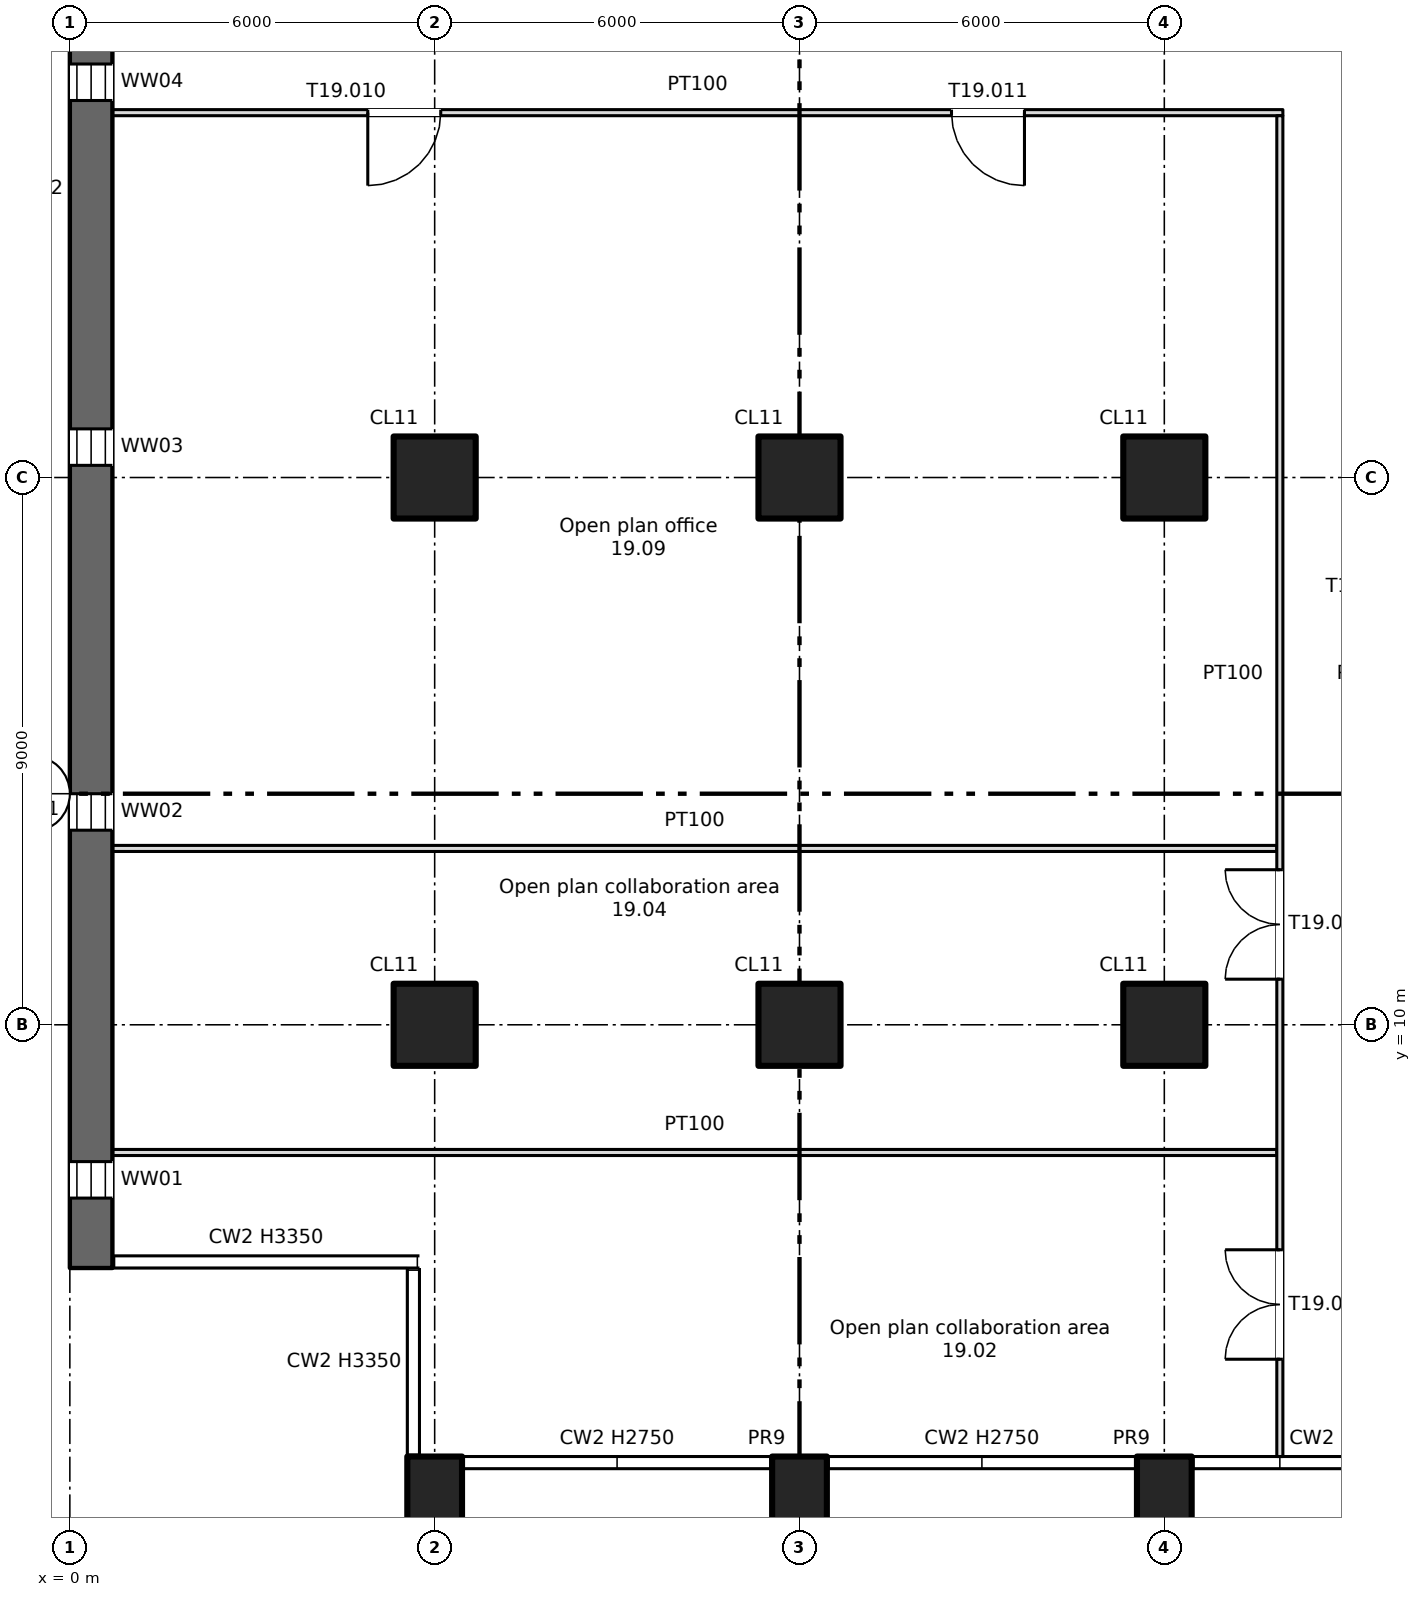
"""IFC4 building model, lengths in metres.
Left out: names, types, materials, properties, quantities, classifications, styles, units other than length and angle.
Written with IfcOpenShell. Run it as: python <this file> out.ifc"""

import sys

from ifc_helpers import new_model, si_unit, direction, frame, frame_2d, origin, origin_2d, place, context, subcontext, project, spatial, rectangle, extrude, element, fill, save


model = new_model("IFC4")
c1 = context("Model", 3, precision=1e-05, world=origin(), true_north=direction((0.0, 1.0)))
c2 = subcontext(c1, "Body", "Model", "MODEL_VIEW")
j1 = project(units=[si_unit("LENGTHUNIT", "METRE"), si_unit("PLANEANGLEUNIT", "RADIAN")], contexts=[c1])
p1 = place(None, origin())
s1 = spatial("IfcSite", under=j1, at=p1, CompositionType="ELEMENT")
p2 = place(p1, origin())
s2 = spatial("IfcBuilding", under=s1, at=p2, CompositionType="ELEMENT")
p3 = place(p2, frame((0.0, 0.0, 121.25)))
s3 = spatial("IfcBuildingStorey", under=s2, at=p3, CompositionType="ELEMENT", Elevation=121.25)
for number, where, z_axis, x_axis in (
    (1, (6.0, 2.2, -0.4), (0.0, 0.0, 1.0), (1.0, 0.0, 0.0)),
    (2, (12.0, 2.2, -0.4), (0.0, 0.0, 1.0), (1.0, 0.0, 0.0)),
    (3, (18.0, 2.2, -0.4), (0.0, 0.0, 1.0), (1.0, 0.0, 0.0)),
):
    element("IfcColumn", number, at=place(p3, frame(where, z_axis=z_axis, x_axis=x_axis)), inside=s3, PredefinedType="COLUMN", context=c2, shape_type="SweptSolid", body=[
        extrude(rectangle(XDim=0.9, YDim=1.4, at=origin_2d()), origin(), (0.0, 0.0, 1.0), 3.75),
    ])
for number, where, z_axis, x_axis in (
    (4, (6.0, 10.0, 0.0), (0.0, 0.0, 1.0), (1.0, 0.0, 0.0)),
    (5, (6.0, 19.0, 0.0), (0.0, 0.0, 1.0), (1.0, 0.0, 0.0)),
    (6, (12.0, 10.0, 0.0), (0.0, 0.0, 1.0), (1.0, 0.0, 0.0)),
    (7, (12.0, 19.0, 0.0), (0.0, 0.0, 1.0), (1.0, 0.0, 0.0)),
    (8, (18.0, 10.0, 0.0), (0.0, 0.0, 1.0), (1.0, 0.0, 0.0)),
    (9, (18.0, 19.0, 0.0), (0.0, 0.0, 1.0), (1.0, 0.0, 0.0)),
):
    element("IfcColumn", number, at=place(p3, frame(where, z_axis=z_axis, x_axis=x_axis)), inside=s3, PredefinedType="COLUMN", context=c2, shape_type="SweptSolid", body=[
        extrude(rectangle(XDim=1.35, YDim=1.35, at=origin_2d()), origin(), (0.0, 0.0, 1.0), 3.35),
    ])
p4 = place(p3, frame((0.35, 6.0, 0.0), z_axis=(0.0, 0.0, 1.0), x_axis=(0.0, 1.0, 0.0)))
e10 = element("IfcWall", 10, at=p4, inside=s3, PredefinedType="SHEAR", context=c2, shape_type="SweptSolid", body=[
    extrude(rectangle(XDim=35.5, YDim=0.7, at=frame_2d((17.75, 0.0))), origin(), (0.0, 0.0, 1.0), 3.35),
])
p5 = place(p4, frame((1.15, 0.0, 0.6)))
e11 = element("IfcOpeningElement", 11, at=p5, cuts=e10, PredefinedType="OPENING", context=c2, shape_type="SweptSolid", body=[
    extrude(rectangle(XDim=0.6, YDim=2.4, at=frame_2d((0.3, 1.2))), frame((0.0, 0.36, 0.0), z_axis=(0.0, -1.0, 0.0), x_axis=(1.0, 0.0, 0.0)), (0.0, 0.0, 1.0), 0.72),
])
p6 = place(p4, frame((7.2, 0.0, 0.6)))
e12 = element("IfcOpeningElement", 12, at=p6, cuts=e10, PredefinedType="OPENING", context=c2, shape_type="SweptSolid", body=[
    extrude(rectangle(XDim=0.6, YDim=2.4, at=frame_2d((0.3, 1.2))), frame((0.0, 0.36, 0.0), z_axis=(0.0, -1.0, 0.0), x_axis=(1.0, 0.0, 0.0)), (0.0, 0.0, 1.0), 0.72),
])
p7 = place(p4, frame((13.2, 0.0, 0.6)))
e13 = element("IfcOpeningElement", 13, at=p7, cuts=e10, PredefinedType="OPENING", context=c2, shape_type="SweptSolid", body=[
    extrude(rectangle(XDim=0.6, YDim=2.4, at=frame_2d((0.3, 1.2))), frame((0.0, 0.36, 0.0), z_axis=(0.0, -1.0, 0.0), x_axis=(1.0, 0.0, 0.0)), (0.0, 0.0, 1.0), 0.72),
])
p8 = place(p4, frame((19.2, 0.0, 0.6)))
e14 = element("IfcOpeningElement", 14, at=p8, cuts=e10, PredefinedType="OPENING", context=c2, shape_type="SweptSolid", body=[
    extrude(rectangle(XDim=0.6, YDim=2.4, at=frame_2d((0.3, 1.2))), frame((0.0, 0.36, 0.0), z_axis=(0.0, -1.0, 0.0), x_axis=(1.0, 0.0, 0.0)), (0.0, 0.0, 1.0), 0.72),
])
p9 = place(p4, frame((25.2, 0.0, 0.6)))
e15 = element("IfcOpeningElement", 15, at=p9, cuts=e10, PredefinedType="OPENING", context=c2, shape_type="SweptSolid", body=[
    extrude(rectangle(XDim=0.6, YDim=2.4, at=frame_2d((0.3, 1.2))), frame((0.0, 0.36, 0.0), z_axis=(0.0, -1.0, 0.0), x_axis=(1.0, 0.0, 0.0)), (0.0, 0.0, 1.0), 0.72),
])
p10 = place(p4, frame((31.2, 0.0, 0.6)))
e16 = element("IfcOpeningElement", 16, at=p10, cuts=e10, PredefinedType="OPENING", context=c2, shape_type="SweptSolid", body=[
    extrude(rectangle(XDim=0.6, YDim=2.4, at=frame_2d((0.3, 1.2))), frame((0.0, 0.36, 0.0), z_axis=(0.0, -1.0, 0.0), x_axis=(1.0, 0.0, 0.0)), (0.0, 0.0, 1.0), 0.72),
])
for number, where, z_axis, x_axis in (
    (17, (0.7, 7.9, 0.0), (0.0, 0.0, 1.0), (1.0, 0.0, 0.0)),
    (18, (0.7, 12.9, 0.0), (0.0, 0.0, 1.0), (1.0, 0.0, 0.0)),
):
    element("IfcWall", number, at=place(p3, frame(where, z_axis=z_axis, x_axis=x_axis)), inside=s3, PredefinedType="PARTITIONING", context=c2, shape_type="SweptSolid", body=[
        extrude(rectangle(XDim=19.15, YDim=0.1, at=frame_2d((9.575, 0.0))), origin(), (0.0, 0.0, 1.0), 3.35),
    ])
p11 = place(p3, frame((0.7, 25.0, 0.0), z_axis=(0.0, 0.0, 1.0), x_axis=(1.0, 0.0, 0.0)))
e19 = element("IfcWall", 19, at=p11, inside=s3, PredefinedType="PARTITIONING", context=c2, shape_type="SweptSolid", body=[
    extrude(rectangle(XDim=19.25, YDim=0.1, at=frame_2d((9.625, 0.0))), origin(), (0.0, 0.0, 1.0), 3.35),
])
p12 = place(p11, frame((4.2, 0.0, 0.0)))
e20 = element("IfcOpeningElement", 20, at=p12, cuts=e19, PredefinedType="OPENING", context=c2, shape_type="SweptSolid", body=[
    extrude(rectangle(XDim=1.2, YDim=2.1, at=frame_2d((0.6, 1.05))), frame((0.0, 0.06, 0.0), z_axis=(0.0, -1.0, 0.0), x_axis=(1.0, 0.0, 0.0)), (0.0, 0.0, 1.0), 0.12),
])
p13 = place(p11, frame((13.8, 0.0, 0.0)))
e21 = element("IfcOpeningElement", 21, at=p13, cuts=e19, PredefinedType="OPENING", context=c2, shape_type="SweptSolid", body=[
    extrude(rectangle(XDim=1.2, YDim=2.1, at=frame_2d((0.6, 1.05))), frame((0.0, 0.06, 0.0), z_axis=(0.0, -1.0, 0.0), x_axis=(1.0, 0.0, 0.0)), (0.0, 0.0, 1.0), 0.12),
])
p14 = place(p3, frame((19.9, 2.9, 0.0), z_axis=(0.0, 0.0, 1.0), x_axis=(0.0, 1.0, 0.0)))
e22 = element("IfcWall", 22, at=p14, inside=s3, PredefinedType="PARTITIONING", context=c2, shape_type="SweptSolid", body=[
    extrude(rectangle(XDim=22.05, YDim=0.1, at=frame_2d((11.025, 0.0))), origin(), (0.0, 0.0, 1.0), 3.35),
])
p15 = place(p14, frame((1.6, 0.0, 0.0)))
e23 = element("IfcOpeningElement", 23, at=p15, cuts=e22, PredefinedType="OPENING", context=c2, shape_type="SweptSolid", body=[
    extrude(rectangle(XDim=1.8, YDim=2.1, at=frame_2d((0.9, 1.05))), frame((0.0, 0.06, 0.0), z_axis=(0.0, -1.0, 0.0), x_axis=(1.0, 0.0, 0.0)), (0.0, 0.0, 1.0), 0.12),
])
p16 = place(p14, frame((7.85, 0.0, 0.0)))
e24 = element("IfcOpeningElement", 24, at=p16, cuts=e22, PredefinedType="OPENING", context=c2, shape_type="SweptSolid", body=[
    extrude(rectangle(XDim=1.8, YDim=2.1, at=frame_2d((0.9, 1.05))), frame((0.0, 0.06, 0.0), z_axis=(0.0, -1.0, 0.0), x_axis=(1.0, 0.0, 0.0)), (0.0, 0.0, 1.0), 0.12),
])
p17 = place(p5, origin())
e25 = element("IfcWindow", 25, at=p17, inside=s3, PartitioningType="SINGLE_PANEL", PredefinedType="WINDOW", context=c2, shape_type="SweptSolid", body=[
    extrude(rectangle(XDim=0.6, YDim=2.4, at=frame_2d((0.3, 1.2))), frame((0.0, 0.03, 0.0), z_axis=(0.0, -1.0, 0.0), x_axis=(1.0, 0.0, 0.0)), (0.0, 0.0, 1.0), 0.06),
])
fill(e11, e25)
p18 = place(p6, origin())
e26 = element("IfcWindow", 26, at=p18, inside=s3, PartitioningType="SINGLE_PANEL", PredefinedType="WINDOW", context=c2, shape_type="SweptSolid", body=[
    extrude(rectangle(XDim=0.6, YDim=2.4, at=frame_2d((0.3, 1.2))), frame((0.0, 0.03, 0.0), z_axis=(0.0, -1.0, 0.0), x_axis=(1.0, 0.0, 0.0)), (0.0, 0.0, 1.0), 0.06),
])
fill(e12, e26)
p19 = place(p7, origin())
e27 = element("IfcWindow", 27, at=p19, inside=s3, PartitioningType="SINGLE_PANEL", PredefinedType="WINDOW", context=c2, shape_type="SweptSolid", body=[
    extrude(rectangle(XDim=0.6, YDim=2.4, at=frame_2d((0.3, 1.2))), frame((0.0, 0.03, 0.0), z_axis=(0.0, -1.0, 0.0), x_axis=(1.0, 0.0, 0.0)), (0.0, 0.0, 1.0), 0.06),
])
fill(e13, e27)
p20 = place(p8, origin())
e28 = element("IfcWindow", 28, at=p20, inside=s3, PartitioningType="SINGLE_PANEL", PredefinedType="WINDOW", context=c2, shape_type="SweptSolid", body=[
    extrude(rectangle(XDim=0.6, YDim=2.4, at=frame_2d((0.3, 1.2))), frame((0.0, 0.03, 0.0), z_axis=(0.0, -1.0, 0.0), x_axis=(1.0, 0.0, 0.0)), (0.0, 0.0, 1.0), 0.06),
])
fill(e14, e28)
p21 = place(p15, origin())
e29 = element("IfcDoor", 29, at=p21, inside=s3, OperationType="DOUBLE_DOOR_SINGLE_SWING", PredefinedType="DOOR", context=c2, shape_type="SweptSolid", body=[
    extrude(rectangle(XDim=1.8, YDim=2.1, at=frame_2d((0.9, 1.05))), frame((0.0, 0.025, 0.0), z_axis=(0.0, -1.0, 0.0), x_axis=(1.0, 0.0, 0.0)), (0.0, 0.0, 1.0), 0.05),
])
fill(e23, e29)
p22 = place(p16, origin())
e30 = element("IfcDoor", 30, at=p22, inside=s3, OperationType="DOUBLE_DOOR_SINGLE_SWING", PredefinedType="DOOR", context=c2, shape_type="SweptSolid", body=[
    extrude(rectangle(XDim=1.8, YDim=2.1, at=frame_2d((0.9, 1.05))), frame((0.0, 0.025, 0.0), z_axis=(0.0, -1.0, 0.0), x_axis=(1.0, 0.0, 0.0)), (0.0, 0.0, 1.0), 0.05),
])
fill(e24, e30)
p23 = place(p12, origin())
e31 = element("IfcDoor", 31, at=p23, inside=s3, OperationType="SINGLE_SWING_LEFT", PredefinedType="DOOR", context=c2, shape_type="SweptSolid", body=[
    extrude(rectangle(XDim=1.2, YDim=2.1, at=frame_2d((0.6, 1.05))), frame((0.0, 0.025, 0.0), z_axis=(0.0, -1.0, 0.0), x_axis=(1.0, 0.0, 0.0)), (0.0, 0.0, 1.0), 0.05),
])
fill(e20, e31)
p24 = place(p13, origin())
e32 = element("IfcDoor", 32, at=p24, inside=s3, OperationType="SINGLE_SWING_RIGHT", PredefinedType="DOOR", context=c2, shape_type="SweptSolid", body=[
    extrude(rectangle(XDim=1.2, YDim=2.1, at=frame_2d((0.6, 1.05))), frame((0.0, 0.025, 0.0), z_axis=(0.0, -1.0, 0.0), x_axis=(1.0, 0.0, 0.0)), (0.0, 0.0, 1.0), 0.05),
])
fill(e21, e32)
save(model, sys.argv[1])
